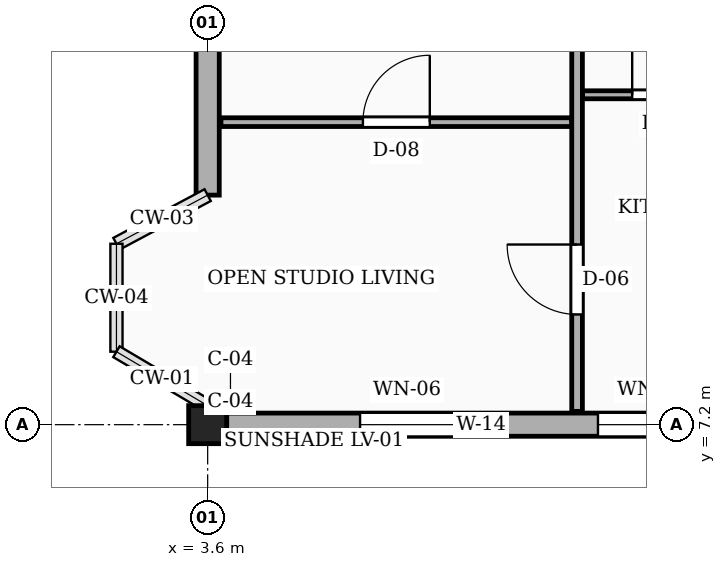
"""IFC4 building model, lengths in metres.
Left out: names, types, materials, properties, quantities, classifications, styles, units other than length and angle.
Written with IfcOpenShell. Run it as: python <this file> out.ifc"""

import sys

from ifc_helpers import new_model, si_unit, direction, frame, frame_2d, origin, origin_2d, place, context, subcontext, project, spatial, rectangle, extrude, element, fill, save


model = new_model("IFC4")
c1 = context("Model", 3, precision=1e-05, world=origin(), true_north=direction((0.0, 1.0)))
c2 = subcontext(c1, "Body", "Model", "MODEL_VIEW")
j1 = project(units=[si_unit("LENGTHUNIT", "METRE"), si_unit("PLANEANGLEUNIT", "RADIAN")], contexts=[c1])
p1 = place(None, origin())
s1 = spatial("IfcSite", under=j1, at=p1, CompositionType="ELEMENT")
p2 = place(p1, origin())
s2 = spatial("IfcBuilding", under=s1, at=p2, CompositionType="ELEMENT")
p3 = place(p2, frame((0.0, 0.0, 29.7)))
s3 = spatial("IfcBuildingStorey", under=s2, at=p3, CompositionType="ELEMENT", Elevation=29.7)
p4 = place(p3, frame((3.6, 7.2, 0.0), z_axis=(0.0, 0.0, 1.0), x_axis=(1.0, 0.0, 0.0)))
e1 = element("IfcColumn", 1, at=p4, inside=s3, PredefinedType="COLUMN", context=c2, shape_type="SweptSolid", body=[
    extrude(rectangle(XDim=0.5, YDim=0.5, at=origin_2d()), origin(), (0.0, 0.0, 1.0), 3.15),
])
p5 = place(p3, frame((3.85, 7.2, 0.0), z_axis=(0.0, 0.0, 1.0), x_axis=(1.0, 0.0, 0.0)))
e2 = element("IfcWall", 2, at=p5, inside=s3, PredefinedType="SOLIDWALL", context=c2, shape_type="SweptSolid", body=[
    extrude(rectangle(XDim=6.7, YDim=0.305, at=frame_2d((3.35, 0.0))), origin(), (0.0, 0.0, 1.0), 2.44),
])
p6 = place(p5, frame((1.755, 0.0, 0.78)))
e3 = element("IfcOpeningElement", 3, at=p6, cuts=e2, PredefinedType="OPENING", context=c2, shape_type="SweptSolid", body=[
    extrude(rectangle(XDim=1.24, YDim=1.15, at=frame_2d((0.62, 0.575))), frame((0.0, 0.163, 0.0), z_axis=(0.0, -1.0, 0.0), x_axis=(1.0, 0.0, 0.0)), (0.0, 0.0, 1.0), 0.325),
])
p7 = place(p5, frame((4.885, 0.0, 0.78)))
e4 = element("IfcOpeningElement", 4, at=p7, cuts=e2, PredefinedType="OPENING", context=c2, shape_type="SweptSolid", body=[
    extrude(rectangle(XDim=1.4, YDim=1.15, at=frame_2d((0.7, 0.575))), frame((0.0, 0.163, 0.0), z_axis=(0.0, -1.0, 0.0), x_axis=(1.0, 0.0, 0.0)), (0.0, 0.0, 1.0), 0.325),
])
p8 = place(p3, frame((3.6, 14.15, 0.0), z_axis=(0.0, 0.0, 1.0), x_axis=(0.0, -1.0, 0.0)))
e5 = element("IfcWall", 5, at=p8, inside=s3, PredefinedType="SOLIDWALL", context=c2, shape_type="SweptSolid", body=[
    extrude(rectangle(XDim=3.93, YDim=0.305, at=frame_2d((1.965, 0.0))), origin(), (0.0, 0.0, 1.0), 2.44),
])
p9 = place(p8, frame((1.1, 0.0, 0.78)))
e6 = element("IfcOpeningElement", 6, at=p9, cuts=e5, PredefinedType="OPENING", context=c2, shape_type="SweptSolid", body=[
    extrude(rectangle(XDim=0.88, YDim=1.26, at=frame_2d((0.44, 0.63))), frame((0.0, 0.163, 0.0), z_axis=(0.0, -1.0, 0.0), x_axis=(1.0, 0.0, 0.0)), (0.0, 0.0, 1.0), 0.325),
])
p10 = place(p3, frame((3.775, 11.18, 0.0), z_axis=(0.0, 0.0, 1.0), x_axis=(1.0, 0.0, 0.0)))
e7 = element("IfcWall", 7, at=p10, inside=s3, PredefinedType="PARTITIONING", context=c2, shape_type="SweptSolid", body=[
    extrude(rectangle(XDim=4.615, YDim=0.115, at=frame_2d((2.308, 0.0))), origin(), (0.0, 0.0, 1.0), 2.305),
])
p11 = place(p10, frame((1.867, 0.0, 0.0)))
e8 = element("IfcOpeningElement", 8, at=p11, cuts=e7, PredefinedType="OPENING", context=c2, shape_type="SweptSolid", body=[
    extrude(rectangle(XDim=0.88, YDim=2.08, at=frame_2d((0.44, 1.04))), frame((0.0, 0.067, 0.0), z_axis=(0.0, -1.0, 0.0), x_axis=(1.0, 0.0, 0.0)), (0.0, 0.0, 1.0), 0.135),
])
p12 = place(p3, frame((8.53, 11.54, 0.0), z_axis=(0.0, 0.0, 1.0), x_axis=(1.0, 0.0, 0.0)))
e9 = element("IfcWall", 9, at=p12, inside=s3, PredefinedType="PARTITIONING", context=c2, shape_type="SweptSolid", body=[
    extrude(rectangle(XDim=2.18, YDim=0.105, at=frame_2d((1.09, 0.0))), origin(), (0.0, 0.0, 1.0), 2.305),
])
p13 = place(p12, frame((0.655, 0.0, 0.0)))
e10 = element("IfcOpeningElement", 10, at=p13, cuts=e9, PredefinedType="OPENING", context=c2, shape_type="SweptSolid", body=[
    extrude(rectangle(XDim=0.87, YDim=2.05, at=frame_2d((0.435, 1.025))), frame((0.0, 0.062, 0.0), z_axis=(0.0, -1.0, 0.0), x_axis=(1.0, 0.0, 0.0)), (0.0, 0.0, 1.0), 0.125),
])
p14 = place(p3, frame((8.46, 7.375, 0.0), z_axis=(0.0, 0.0, 1.0), x_axis=(0.0, 1.0, 0.0)))
e11 = element("IfcWall", 11, at=p14, inside=s3, PredefinedType="PARTITIONING", context=c2, shape_type="SweptSolid", body=[
    extrude(rectangle(XDim=6.885, YDim=0.14, at=frame_2d((3.442, 0.0))), origin(), (0.0, 0.0, 1.0), 2.305),
])
p15 = place(p14, frame((1.275, 0.0, 0.0)))
e12 = element("IfcOpeningElement", 12, at=p15, cuts=e11, PredefinedType="OPENING", context=c2, shape_type="SweptSolid", body=[
    extrude(rectangle(XDim=0.92, YDim=2.1, at=frame_2d((0.46, 1.05))), frame((0.0, 0.08, 0.0), z_axis=(0.0, -1.0, 0.0), x_axis=(1.0, 0.0, 0.0)), (0.0, 0.0, 1.0), 0.16),
])
p16 = place(p6, origin())
e13 = element("IfcWindow", 13, at=p16, inside=s3, PartitioningType="SINGLE_PANEL", PredefinedType="WINDOW", context=c2, shape_type="SweptSolid", body=[
    extrude(rectangle(XDim=1.24, YDim=1.15, at=frame_2d((0.62, 0.575))), frame((0.0, 0.03, 0.0), z_axis=(0.0, -1.0, 0.0), x_axis=(1.0, 0.0, 0.0)), (0.0, 0.0, 1.0), 0.06),
])
fill(e3, e13)
p17 = place(p7, origin())
e14 = element("IfcWindow", 14, at=p17, inside=s3, PartitioningType="SINGLE_PANEL", PredefinedType="WINDOW", context=c2, shape_type="SweptSolid", body=[
    extrude(rectangle(XDim=1.4, YDim=1.15, at=frame_2d((0.7, 0.575))), frame((0.0, 0.03, 0.0), z_axis=(0.0, -1.0, 0.0), x_axis=(1.0, 0.0, 0.0)), (0.0, 0.0, 1.0), 0.06),
])
fill(e4, e14)
p18 = place(p11, origin())
e15 = element("IfcDoor", 15, at=p18, inside=s3, OperationType="SINGLE_SWING_RIGHT", PredefinedType="DOOR", context=c2, shape_type="SweptSolid", body=[
    extrude(rectangle(XDim=0.88, YDim=2.08, at=frame_2d((0.44, 1.04))), frame((0.0, 0.025, 0.0), z_axis=(0.0, -1.0, 0.0), x_axis=(1.0, 0.0, 0.0)), (0.0, 0.0, 1.0), 0.05),
])
fill(e8, e15)
p19 = place(p13, origin())
e16 = element("IfcDoor", 16, at=p19, inside=s3, OperationType="SINGLE_SWING_LEFT", PredefinedType="DOOR", context=c2, shape_type="SweptSolid", body=[
    extrude(rectangle(XDim=0.87, YDim=2.05, at=frame_2d((0.435, 1.025))), frame((0.0, 0.025, 0.0), z_axis=(0.0, -1.0, 0.0), x_axis=(1.0, 0.0, 0.0)), (0.0, 0.0, 1.0), 0.05),
])
fill(e10, e16)
p20 = place(p15, origin())
e17 = element("IfcDoor", 17, at=p20, inside=s3, OperationType="SINGLE_SWING_RIGHT", PredefinedType="DOOR", context=c2, shape_type="SweptSolid", body=[
    extrude(rectangle(XDim=0.92, YDim=2.1, at=frame_2d((0.46, 1.05))), frame((0.0, 0.025, 0.0), z_axis=(0.0, -1.0, 0.0), x_axis=(1.0, 0.0, 0.0)), (0.0, 0.0, 1.0), 0.05),
])
fill(e12, e17)
save(model, sys.argv[1])
